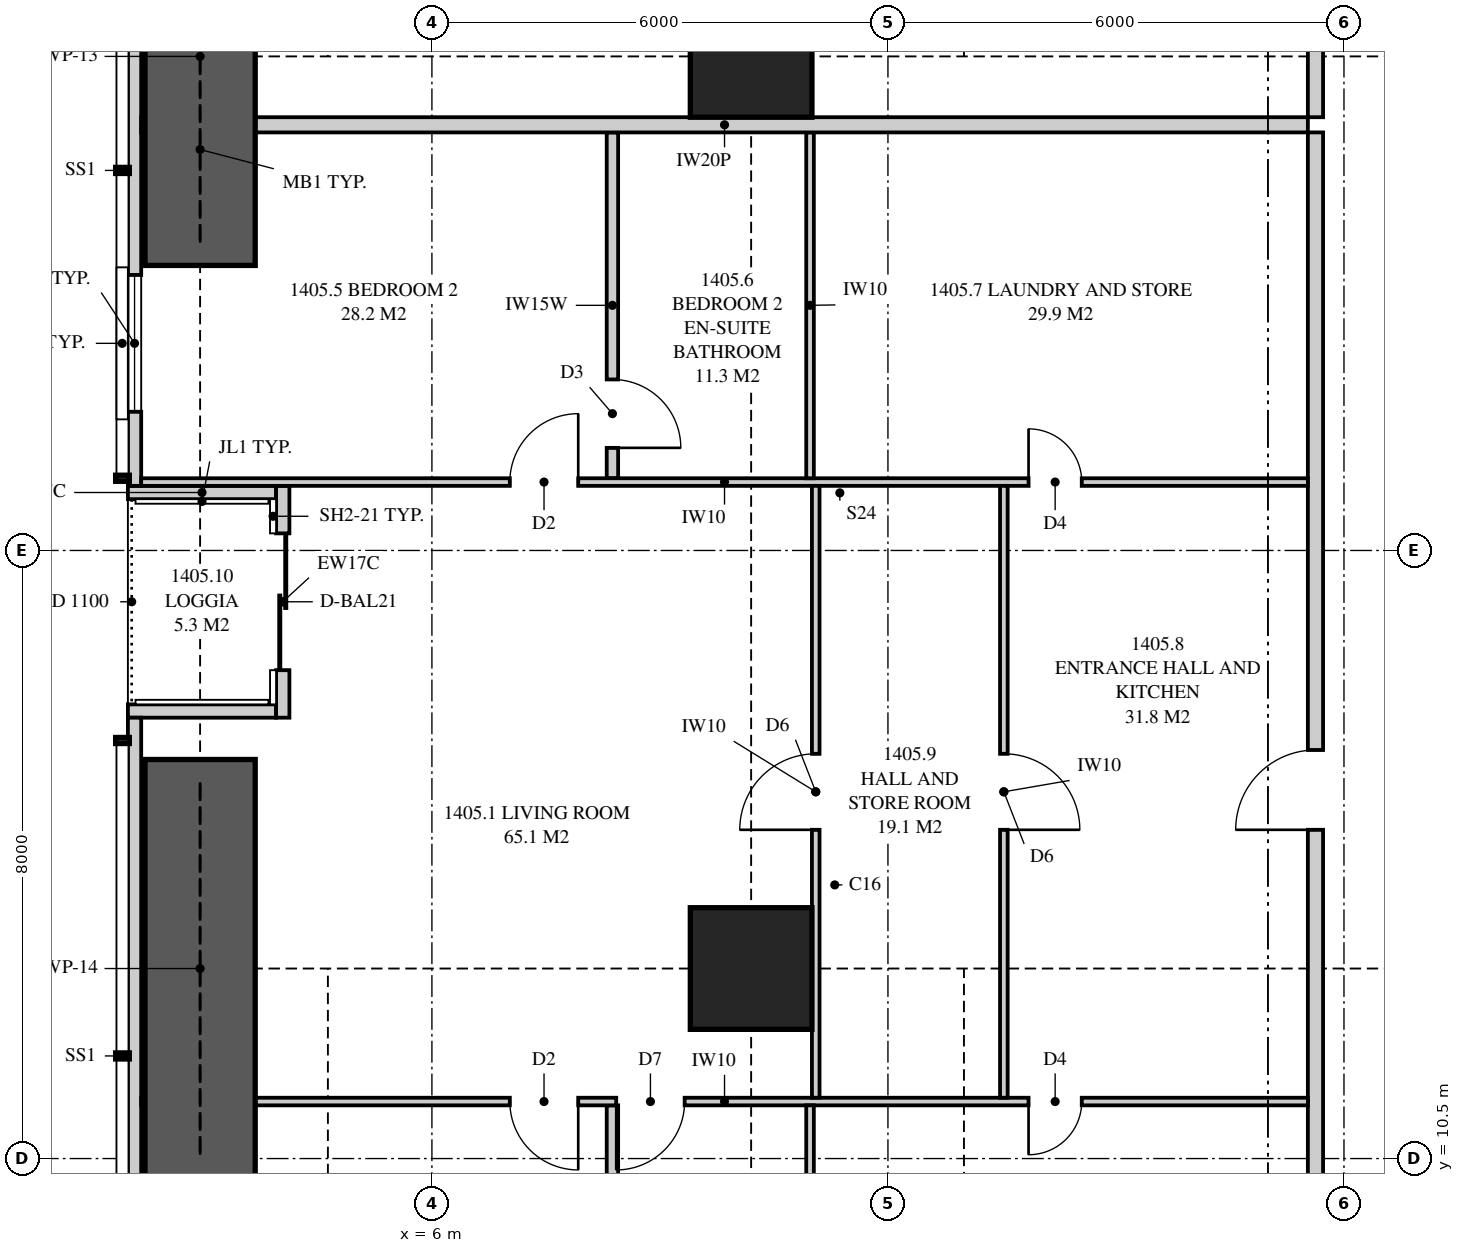
"""IFC4 building model, lengths in metres.
Left out: names, types, materials, properties, quantities, classifications, styles, units other than length and angle.
Written with IfcOpenShell. Run it as: python <this file> out.ifc"""

import sys

from ifc_helpers import new_model, si_unit, direction, frame, frame_2d, origin, origin_2d, place, context, subcontext, project, spatial, polyline, rectangle, outline, extrude, element, fill, save


model = new_model("IFC4")
c1 = context("Model", 3, precision=1e-05, world=origin(), true_north=direction((0.0, 1.0)))
c2 = subcontext(c1, "Body", "Model", "MODEL_VIEW")
j1 = project(units=[si_unit("LENGTHUNIT", "METRE"), si_unit("PLANEANGLEUNIT", "RADIAN")], contexts=[c1])
p1 = place(None, origin())
s1 = spatial("IfcSite", under=j1, at=p1, CompositionType="ELEMENT")
p2 = place(p1, origin())
s2 = spatial("IfcBuilding", under=s1, at=p2, CompositionType="ELEMENT")
p3 = place(p2, frame((0.0, 0.0, 54.5)))
s3 = spatial("IfcBuildingStorey", under=s2, at=p3, CompositionType="ELEMENT", Elevation=54.5)
for number, where, z_axis, x_axis in (
    (1, (10.2, 13.0, 0.0), (0.0, 0.0, 1.0), (1.0, 0.0, 0.0)),
    (2, (10.2, 25.0, 0.0), (0.0, 0.0, 1.0), (1.0, 0.0, 0.0)),
):
    element("IfcColumn", number, at=place(p3, frame(where, z_axis=z_axis, x_axis=x_axis)), inside=s3, PredefinedType="COLUMN", context=c2, shape_type="SweptSolid", body=[
        extrude(rectangle(XDim=1.6, YDim=1.6, at=origin_2d()), origin(), (0.0, 0.0, 1.0), 3.35),
    ])
p4 = place(p3, frame((2.087, 34.949, 0.0), z_axis=(0.0, 0.0, 1.0), x_axis=(0.0, -1.0, 0.0)))
e3 = element("IfcWall", 3, at=p4, inside=s3, PredefinedType="SOLIDWALL", context=c2, shape_type="SweptSolid", body=[
    extrude(outline(polyline([(0.0, 0.0), (15.599, 0.0), (15.599, 2.15), (9.949, 2.15), (9.949, 3.11), (9.823, 3.11), (9.823, 2.15), (9.73, 2.15), (9.73, 3.11), (0.0, 3.11), (0.0, 0.0)])), frame((0.0, 0.087, 0.0), z_axis=(0.0, -1.0, 0.0), x_axis=(1.0, 0.0, 0.0)), (0.0, 0.0, 1.0), 0.175),
])
p5 = place(p4, frame((2.722, 0.0, 0.4)))
e4 = element("IfcOpeningElement", 4, at=p5, cuts=e3, PredefinedType="OPENING", context=c2, shape_type="SweptSolid", body=[
    extrude(rectangle(XDim=1.8, YDim=1.7, at=frame_2d((0.9, 0.85))), frame((0.0, 0.097, 0.0), z_axis=(0.0, -1.0, 0.0), x_axis=(1.0, 0.0, 0.0)), (0.0, 0.0, 1.0), 0.195),
])
p6 = place(p4, frame((5.899, 0.0, 0.4)))
e5 = element("IfcOpeningElement", 5, at=p6, cuts=e3, PredefinedType="OPENING", context=c2, shape_type="SweptSolid", body=[
    extrude(rectangle(XDim=1.2, YDim=1.7, at=frame_2d((0.6, 0.85))), frame((0.0, 0.097, 0.0), z_axis=(0.0, -1.0, 0.0), x_axis=(1.0, 0.0, 0.0)), (0.0, 0.0, 1.0), 0.195),
])
p7 = place(p4, frame((12.824, 0.0, 0.4)))
e6 = element("IfcOpeningElement", 6, at=p7, cuts=e3, PredefinedType="OPENING", context=c2, shape_type="SweptSolid", body=[
    extrude(rectangle(XDim=1.8, YDim=1.7, at=frame_2d((0.9, 0.85))), frame((0.0, 0.097, 0.0), z_axis=(0.0, -1.0, 0.0), x_axis=(1.0, 0.0, 0.0)), (0.0, 0.0, 1.0), 0.195),
])
p8 = place(p3, frame((2.087, 16.3, 0.0), z_axis=(0.0, 0.0, 1.0), x_axis=(0.0, -1.0, 0.0)))
e7 = element("IfcWall", 7, at=p8, inside=s3, PredefinedType="SOLIDWALL", context=c2, shape_type="SweptSolid", body=[
    extrude(outline(polyline([(0.0, 0.0), (13.249, 0.0), (13.249, 3.11), (3.519, 3.11), (3.519, 2.15), (3.426, 2.15), (3.426, 3.11), (3.3, 3.11), (3.3, 2.15), (0.0, 2.15), (0.0, 0.0)])), frame((0.0, 0.087, 0.0), z_axis=(0.0, -1.0, 0.0), x_axis=(1.0, 0.0, 0.0)), (0.0, 0.0, 1.0), 0.175),
])
p9 = place(p8, frame((6.175, 0.0, 0.4)))
e8 = element("IfcOpeningElement", 8, at=p9, cuts=e7, PredefinedType="OPENING", context=c2, shape_type="SweptSolid", body=[
    extrude(rectangle(XDim=1.8, YDim=1.7, at=frame_2d((0.9, 0.85))), frame((0.0, 0.097, 0.0), z_axis=(0.0, -1.0, 0.0), x_axis=(1.0, 0.0, 0.0)), (0.0, 0.0, 1.0), 0.195),
])
p10 = place(p8, frame((9.227, 0.0, 0.4)))
e9 = element("IfcOpeningElement", 9, at=p10, cuts=e7, PredefinedType="OPENING", context=c2, shape_type="SweptSolid", body=[
    extrude(rectangle(XDim=1.8, YDim=1.7, at=frame_2d((0.9, 0.85))), frame((0.0, 0.097, 0.0), z_axis=(0.0, -1.0, 0.0), x_axis=(1.0, 0.0, 0.0)), (0.0, 0.0, 1.0), 0.195),
])
p11 = place(p3, frame((4.038, 19.35, 0.0), z_axis=(0.0, 0.0, 1.0), x_axis=(0.0, -1.0, 0.0)))
e10 = element("IfcWall", 10, at=p11, inside=s3, PredefinedType="SOLIDWALL", context=c2, shape_type="SweptSolid", body=[
    extrude(rectangle(XDim=3.05, YDim=0.175, at=frame_2d((1.525, 0.0))), origin(), (0.0, 0.0, 1.0), 3.11),
])
p12 = place(p11, frame((0.625, 0.0, 0.0)))
e11 = element("IfcOpeningElement", 11, at=p12, cuts=e10, PredefinedType="OPENING", context=c2, shape_type="SweptSolid", body=[
    extrude(rectangle(XDim=1.8, YDim=2.1, at=frame_2d((0.9, 1.05))), frame((0.0, 0.097, 0.0), z_axis=(0.0, -1.0, 0.0), x_axis=(1.0, 0.0, 0.0)), (0.0, 0.0, 1.0), 0.195),
])
for number, where, z_axis, x_axis in (
    (12, (2.0, 19.262, 0.0), (0.0, 0.0, 1.0), (1.0, 0.0, 0.0)),
    (13, (2.0, 16.387, 0.0), (0.0, 0.0, 1.0), (1.0, 0.0, 0.0)),
):
    element("IfcWall", number, at=place(p3, frame(where, z_axis=z_axis, x_axis=x_axis)), inside=s3, PredefinedType="SOLIDWALL", context=c2, shape_type="SweptSolid", body=[
        extrude(outline(polyline([(0.0, 0.0), (1.95, 0.0), (1.95, 3.11), (1.75, 3.11), (1.75, 2.15), (0.15, 2.15), (0.15, 3.11), (0.0, 3.11), (0.0, 0.0)])), frame((0.0, 0.087, 0.0), z_axis=(0.0, -1.0, 0.0), x_axis=(1.0, 0.0, 0.0)), (0.0, 0.0, 1.0), 0.175),
    ])
p13 = place(p3, frame((2.175, 24.1, 0.0), z_axis=(0.0, 0.0, 1.0), x_axis=(1.0, 0.0, 0.0)))
e14 = element("IfcWall", 14, at=p13, inside=s3, PredefinedType="PARTITIONING", context=c2, shape_type="SweptSolid", body=[
    extrude(outline(polyline([(0.529, 2.15), (0.0, 2.15), (0.0, 0.0), (0.529, 0.0), (0.529, 0.889), (1.021, 0.889), (1.021, 0.0), (15.35, 0.0), (15.35, 3.11), (9.335, 3.11), (9.335, 2.51), (6.715, 2.51), (6.715, 3.11), (1.685, 3.11), (1.685, 2.15), (1.021, 2.15), (1.021, 1.261), (0.529, 1.261), (0.529, 2.15)])), frame((0.0, 0.1, 0.0), z_axis=(0.0, -1.0, 0.0), x_axis=(1.0, 0.0, 0.0)), (0.0, 0.0, 1.0), 0.2),
])
p14 = place(p3, frame((17.625, 7.75, 0.0), z_axis=(0.0, 0.0, 1.0), x_axis=(0.0, 1.0, 0.0)))
e15 = element("IfcWall", 15, at=p14, inside=s3, PredefinedType="PARTITIONING", context=c2, shape_type="SweptSolid", body=[
    extrude(outline(polyline([(0.0, 0.0), (16.25, 0.0), (16.25, 3.11), (5.587, 3.11), (5.587, 2.541), (4.913, 2.541), (4.913, 3.11), (0.0, 3.11), (0.0, 0.0)])), frame((0.0, 0.1, 0.0), z_axis=(0.0, -1.0, 0.0), x_axis=(1.0, 0.0, 0.0)), (0.0, 0.0, 1.0), 0.2),
])
p15 = place(p14, frame((7.075, 0.0, 0.0)))
e16 = element("IfcOpeningElement", 16, at=p15, cuts=e15, PredefinedType="OPENING", context=c2, shape_type="SweptSolid", body=[
    extrude(rectangle(XDim=1.05, YDim=2.2, at=frame_2d((0.525, 1.1))), frame((0.0, 0.11, 0.0), z_axis=(0.0, -1.0, 0.0), x_axis=(1.0, 0.0, 0.0)), (0.0, 0.0, 1.0), 0.22),
])
p16 = place(p3, frame((2.175, 11.25, 0.0), z_axis=(0.0, 0.0, 1.0), x_axis=(1.0, 0.0, 0.0)))
e17 = element("IfcWall", 17, at=p16, inside=s3, PredefinedType="PARTITIONING", context=c2, shape_type="SweptSolid", body=[
    extrude(outline(polyline([(0.188, 3.11), (0.0, 3.11), (0.0, 0.0), (0.529, 0.0), (0.529, 0.273), (1.021, 0.273), (1.021, 0.0), (15.35, 0.0), (15.35, 3.11), (11.112, 3.11), (11.112, 2.541), (10.538, 2.541), (10.538, 3.11), (9.285, 3.11), (9.285, 2.51), (6.765, 2.51), (6.765, 3.11), (2.744, 3.11), (2.744, 2.541), (2.169, 2.541), (2.169, 3.11), (1.93, 3.11), (1.93, 2.15), (1.021, 2.15), (1.021, 1.876), (0.529, 1.876), (0.529, 2.15), (0.188, 2.15), (0.188, 3.11)])), frame((0.0, 0.05, 0.0), z_axis=(0.0, -1.0, 0.0), x_axis=(1.0, 0.0, 0.0)), (0.0, 0.0, 1.0), 0.1),
])
p17 = place(p16, frame((4.85, 0.0, 0.0)))
e18 = element("IfcOpeningElement", 18, at=p17, cuts=e17, PredefinedType="OPENING", context=c2, shape_type="SweptSolid", body=[
    extrude(rectangle(XDim=0.9, YDim=2.1, at=frame_2d((0.45, 1.05))), frame((0.0, 0.06, 0.0), z_axis=(0.0, -1.0, 0.0), x_axis=(1.0, 0.0, 0.0)), (0.0, 0.0, 1.0), 0.12),
])
p18 = place(p16, frame((6.25, 0.0, 0.0)))
e19 = element("IfcOpeningElement", 19, at=p18, cuts=e17, PredefinedType="OPENING", context=c2, shape_type="SweptSolid", body=[
    extrude(rectangle(XDim=0.9, YDim=2.1, at=frame_2d((0.45, 1.05))), frame((0.0, 0.06, 0.0), z_axis=(0.0, -1.0, 0.0), x_axis=(1.0, 0.0, 0.0)), (0.0, 0.0, 1.0), 0.12),
])
p19 = place(p16, frame((11.675, 0.0, 0.0)))
e20 = element("IfcOpeningElement", 20, at=p19, cuts=e17, PredefinedType="OPENING", context=c2, shape_type="SweptSolid", body=[
    extrude(rectangle(XDim=0.7, YDim=2.1, at=frame_2d((0.35, 1.05))), frame((0.0, 0.06, 0.0), z_axis=(0.0, -1.0, 0.0), x_axis=(1.0, 0.0, 0.0)), (0.0, 0.0, 1.0), 0.12),
])
p20 = place(p3, frame((2.175, 19.4, 0.0), z_axis=(0.0, 0.0, 1.0), x_axis=(1.0, 0.0, 0.0)))
e21 = element("IfcWall", 21, at=p20, inside=s3, PredefinedType="PARTITIONING", context=c2, shape_type="SweptSolid", body=[
    extrude(outline(polyline([(0.0, 0.0), (15.35, 0.0), (15.35, 3.11), (9.285, 3.11), (9.285, 2.51), (6.765, 2.51), (6.765, 3.11), (1.635, 3.11), (1.635, 2.15), (0.0, 2.15), (0.0, 3.11), (0.0, 0.0)])), frame((0.0, 0.05, 0.0), z_axis=(0.0, -1.0, 0.0), x_axis=(1.0, 0.0, 0.0)), (0.0, 0.0, 1.0), 0.1),
])
p21 = place(p20, frame((4.85, 0.0, 0.0)))
e22 = element("IfcOpeningElement", 22, at=p21, cuts=e21, PredefinedType="OPENING", context=c2, shape_type="SweptSolid", body=[
    extrude(rectangle(XDim=0.9, YDim=2.1, at=frame_2d((0.45, 1.05))), frame((0.0, 0.06, 0.0), z_axis=(0.0, -1.0, 0.0), x_axis=(1.0, 0.0, 0.0)), (0.0, 0.0, 1.0), 0.12),
])
p22 = place(p20, frame((11.675, 0.0, 0.0)))
e23 = element("IfcOpeningElement", 23, at=p22, cuts=e21, PredefinedType="OPENING", context=c2, shape_type="SweptSolid", body=[
    extrude(rectangle(XDim=0.7, YDim=2.1, at=frame_2d((0.35, 1.05))), frame((0.0, 0.06, 0.0), z_axis=(0.0, -1.0, 0.0), x_axis=(1.0, 0.0, 0.0)), (0.0, 0.0, 1.0), 0.12),
])
p23 = place(p3, frame((8.375, 7.75, 0.0), z_axis=(0.0, 0.0, 1.0), x_axis=(0.0, 1.0, 0.0)))
e24 = element("IfcWall", 24, at=p23, inside=s3, PredefinedType="PLUMBINGWALL", context=c2, shape_type="SweptSolid", body=[
    extrude(rectangle(XDim=3.45, YDim=0.15, at=frame_2d((1.725, 0.0))), origin(), (0.0, 0.0, 1.0), 3.11),
])
p24 = place(p3, frame((10.975, 7.75, 0.0), z_axis=(0.0, 0.0, 1.0), x_axis=(0.0, 1.0, 0.0)))
e25 = element("IfcWall", 25, at=p24, inside=s3, PredefinedType="PARTITIONING", context=c2, shape_type="SweptSolid", body=[
    extrude(outline(polyline([(0.0, 0.0), (3.45, 0.0), (3.45, 3.11), (3.45, 2.51), (0.0, 2.51), (0.0, 3.11), (0.0, 0.0)])), frame((0.0, 0.05, 0.0), z_axis=(0.0, -1.0, 0.0), x_axis=(1.0, 0.0, 0.0)), (0.0, 0.0, 1.0), 0.1),
])
p25 = place(p3, frame((8.375, 19.45, 0.0), z_axis=(0.0, 0.0, 1.0), x_axis=(0.0, 1.0, 0.0)))
e26 = element("IfcWall", 26, at=p25, inside=s3, PredefinedType="PLUMBINGWALL", context=c2, shape_type="SweptSolid", body=[
    extrude(rectangle(XDim=4.55, YDim=0.15, at=frame_2d((2.275, 0.0))), origin(), (0.0, 0.0, 1.0), 3.11),
])
p26 = place(p25, frame((0.4, 0.0, 0.0)))
e27 = element("IfcOpeningElement", 27, at=p26, cuts=e26, PredefinedType="OPENING", context=c2, shape_type="SweptSolid", body=[
    extrude(rectangle(XDim=0.9, YDim=2.1, at=frame_2d((0.45, 1.05))), frame((0.0, 0.085, 0.0), z_axis=(0.0, -1.0, 0.0), x_axis=(1.0, 0.0, 0.0)), (0.0, 0.0, 1.0), 0.17),
])
p27 = place(p3, frame((10.975, 19.45, 0.0), z_axis=(0.0, 0.0, 1.0), x_axis=(0.0, 1.0, 0.0)))
e28 = element("IfcWall", 28, at=p27, inside=s3, PredefinedType="PARTITIONING", context=c2, shape_type="SweptSolid", body=[
    extrude(outline(polyline([(0.0, 0.0), (4.55, 0.0), (4.55, 3.11), (4.55, 2.51), (0.0, 2.51), (0.0, 3.11), (0.0, 0.0)])), frame((0.0, 0.05, 0.0), z_axis=(0.0, -1.0, 0.0), x_axis=(1.0, 0.0, 0.0)), (0.0, 0.0, 1.0), 0.1),
])
p28 = place(p3, frame((13.525, 11.3, 0.0), z_axis=(0.0, 0.0, 1.0), x_axis=(0.0, 1.0, 0.0)))
e29 = element("IfcWall", 29, at=p28, inside=s3, PredefinedType="PARTITIONING", context=c2, shape_type="SweptSolid", body=[
    extrude(outline(polyline([(0.0, 0.0), (8.05, 0.0), (8.05, 3.11), (1.987, 3.11), (1.987, 2.541), (1.413, 2.541), (1.413, 3.11), (0.0, 3.11), (0.0, 0.0)])), frame((0.0, 0.05, 0.0), z_axis=(0.0, -1.0, 0.0), x_axis=(1.0, 0.0, 0.0)), (0.0, 0.0, 1.0), 0.1),
])
p29 = place(p28, frame((3.525, 0.0, 0.0)))
e30 = element("IfcOpeningElement", 30, at=p29, cuts=e29, PredefinedType="OPENING", context=c2, shape_type="SweptSolid", body=[
    extrude(rectangle(XDim=1.0, YDim=2.1, at=frame_2d((0.5, 1.05))), frame((0.0, 0.06, 0.0), z_axis=(0.0, -1.0, 0.0), x_axis=(1.0, 0.0, 0.0)), (0.0, 0.0, 1.0), 0.12),
])
p30 = place(p3, frame((11.05, 11.3, 0.0), z_axis=(0.0, 0.0, 1.0), x_axis=(0.0, 1.0, 0.0)))
e31 = element("IfcWall", 31, at=p30, inside=s3, PredefinedType="PARTITIONING", context=c2, shape_type="SweptSolid", body=[
    extrude(rectangle(XDim=8.05, YDim=0.1, at=frame_2d((4.025, 0.0))), origin(), (0.0, 0.0, 1.0), 2.51),
])
p31 = place(p30, frame((3.525, 0.0, 0.0)))
e32 = element("IfcOpeningElement", 32, at=p31, cuts=e31, PredefinedType="OPENING", context=c2, shape_type="SweptSolid", body=[
    extrude(rectangle(XDim=1.0, YDim=2.1, at=frame_2d((0.5, 1.05))), frame((0.0, 0.06, 0.0), z_axis=(0.0, -1.0, 0.0), x_axis=(1.0, 0.0, 0.0)), (0.0, 0.0, 1.0), 0.12),
])
p32 = place(p3, frame((17.625, 24.2, 0.0), z_axis=(0.0, 0.0, 1.0), x_axis=(0.0, 1.0, 0.0)))
e33 = element("IfcWall", 33, at=p32, inside=s3, PredefinedType="PARTITIONING", context=c2, shape_type="SweptSolid", body=[
    extrude(outline(polyline([(0.0, 0.0), (5.05, 0.0), (5.05, 3.11), (1.137, 3.11), (1.137, 2.541), (0.463, 2.541), (0.463, 3.11), (0.0, 3.11), (0.0, 0.0)])), frame((0.0, 0.1, 0.0), z_axis=(0.0, -1.0, 0.0), x_axis=(1.0, 0.0, 0.0)), (0.0, 0.0, 1.0), 0.2),
])
p33 = place(p32, frame((1.075, 0.0, 0.0)))
e34 = element("IfcOpeningElement", 34, at=p33, cuts=e33, PredefinedType="OPENING", context=c2, shape_type="SweptSolid", body=[
    extrude(rectangle(XDim=1.8, YDim=2.1, at=frame_2d((0.9, 1.05))), frame((0.0, 0.11, 0.0), z_axis=(0.0, -1.0, 0.0), x_axis=(1.0, 0.0, 0.0)), (0.0, 0.0, 1.0), 0.22),
])
for number, where, z_axis, x_axis in (
    (35, (2.95, 22.25, 0.0), (0.0, 0.0, 1.0), (0.0, 1.0, 0.0)),
    (36, (2.95, 10.25, 0.0), (0.0, 0.0, 1.0), (0.0, 1.0, 0.0)),
):
    element("IfcWall", number, at=place(p3, frame(where, z_axis=z_axis, x_axis=x_axis)), inside=s3, PredefinedType="SHEAR", context=c2, shape_type="SweptSolid", body=[
        extrude(rectangle(XDim=5.5, YDim=1.45, at=frame_2d((2.75, 0.0))), origin(), (0.0, 0.0, 1.0), 3.35),
    ])
p34 = place(p7, origin())
e37 = element("IfcWindow", 37, at=p34, inside=s3, PartitioningType="SINGLE_PANEL", PredefinedType="WINDOW", context=c2, shape_type="SweptSolid", body=[
    extrude(rectangle(XDim=1.8, YDim=1.7, at=frame_2d((0.9, 0.85))), frame((0.0, 0.03, 0.0), z_axis=(0.0, -1.0, 0.0), x_axis=(1.0, 0.0, 0.0)), (0.0, 0.0, 1.0), 0.06),
])
fill(e6, e37)
p35 = place(p12, origin())
e38 = element("IfcDoor", 38, at=p35, inside=s3, OperationType="SLIDING_TO_LEFT", PredefinedType="DOOR", context=c2, shape_type="SweptSolid", body=[
    extrude(rectangle(XDim=1.8, YDim=2.1, at=frame_2d((0.9, 1.05))), frame((0.0, 0.025, 0.0), z_axis=(0.0, -1.0, 0.0), x_axis=(1.0, 0.0, 0.0)), (0.0, 0.0, 1.0), 0.05),
])
fill(e11, e38)
p36 = place(p15, origin())
e39 = element("IfcDoor", 39, at=p36, inside=s3, OperationType="SINGLE_SWING_LEFT", PredefinedType="DOOR", context=c2, shape_type="SweptSolid", body=[
    extrude(rectangle(XDim=1.05, YDim=2.2, at=frame_2d((0.525, 1.1))), frame((0.0, 0.025, 0.0), z_axis=(0.0, -1.0, 0.0), x_axis=(1.0, 0.0, 0.0)), (0.0, 0.0, 1.0), 0.05),
])
fill(e16, e39)
p37 = place(p17, frame((0.9, 0.0, 0.0), z_axis=(0.0, 0.0, 1.0), x_axis=(-1.0, 0.0, 0.0)))
e40 = element("IfcDoor", 40, at=p37, inside=s3, OperationType="SINGLE_SWING_LEFT", PredefinedType="DOOR", context=c2, shape_type="SweptSolid", body=[
    extrude(rectangle(XDim=0.9, YDim=2.1, at=frame_2d((0.45, 1.05))), frame((0.0, 0.025, 0.0), z_axis=(0.0, -1.0, 0.0), x_axis=(1.0, 0.0, 0.0)), (0.0, 0.0, 1.0), 0.05),
])
fill(e18, e40)
p38 = place(p18, frame((0.9, 0.0, 0.0), z_axis=(0.0, 0.0, 1.0), x_axis=(-1.0, 0.0, 0.0)))
e41 = element("IfcDoor", 41, at=p38, inside=s3, OperationType="SINGLE_SWING_RIGHT", PredefinedType="DOOR", context=c2, shape_type="SweptSolid", body=[
    extrude(rectangle(XDim=0.9, YDim=2.1, at=frame_2d((0.45, 1.05))), frame((0.0, 0.025, 0.0), z_axis=(0.0, -1.0, 0.0), x_axis=(1.0, 0.0, 0.0)), (0.0, 0.0, 1.0), 0.05),
])
fill(e19, e41)
p39 = place(p19, frame((0.7, 0.0, 0.0), z_axis=(0.0, 0.0, 1.0), x_axis=(-1.0, 0.0, 0.0)))
e42 = element("IfcDoor", 42, at=p39, inside=s3, OperationType="SINGLE_SWING_RIGHT", PredefinedType="DOOR", context=c2, shape_type="SweptSolid", body=[
    extrude(rectangle(XDim=0.7, YDim=2.1, at=frame_2d((0.35, 1.05))), frame((0.0, 0.025, 0.0), z_axis=(0.0, -1.0, 0.0), x_axis=(1.0, 0.0, 0.0)), (0.0, 0.0, 1.0), 0.05),
])
fill(e20, e42)
p40 = place(p21, origin())
e43 = element("IfcDoor", 43, at=p40, inside=s3, OperationType="SINGLE_SWING_RIGHT", PredefinedType="DOOR", context=c2, shape_type="SweptSolid", body=[
    extrude(rectangle(XDim=0.9, YDim=2.1, at=frame_2d((0.45, 1.05))), frame((0.0, 0.025, 0.0), z_axis=(0.0, -1.0, 0.0), x_axis=(1.0, 0.0, 0.0)), (0.0, 0.0, 1.0), 0.05),
])
fill(e22, e43)
p41 = place(p26, frame((0.9, 0.0, 0.0), z_axis=(0.0, 0.0, 1.0), x_axis=(-1.0, 0.0, 0.0)))
e44 = element("IfcDoor", 44, at=p41, inside=s3, OperationType="SINGLE_SWING_RIGHT", PredefinedType="DOOR", context=c2, shape_type="SweptSolid", body=[
    extrude(rectangle(XDim=0.9, YDim=2.1, at=frame_2d((0.45, 1.05))), frame((0.0, 0.025, 0.0), z_axis=(0.0, -1.0, 0.0), x_axis=(1.0, 0.0, 0.0)), (0.0, 0.0, 1.0), 0.05),
])
fill(e27, e44)
p42 = place(p22, origin())
e45 = element("IfcDoor", 45, at=p42, inside=s3, OperationType="SINGLE_SWING_LEFT", PredefinedType="DOOR", context=c2, shape_type="SweptSolid", body=[
    extrude(rectangle(XDim=0.7, YDim=2.1, at=frame_2d((0.35, 1.05))), frame((0.0, 0.025, 0.0), z_axis=(0.0, -1.0, 0.0), x_axis=(1.0, 0.0, 0.0)), (0.0, 0.0, 1.0), 0.05),
])
fill(e23, e45)
p43 = place(p29, frame((1.0, 0.0, 0.0), z_axis=(0.0, 0.0, 1.0), x_axis=(-1.0, 0.0, 0.0)))
e46 = element("IfcDoor", 46, at=p43, inside=s3, OperationType="SINGLE_SWING_RIGHT", PredefinedType="DOOR", context=c2, shape_type="SweptSolid", body=[
    extrude(rectangle(XDim=1.0, YDim=2.1, at=frame_2d((0.5, 1.05))), frame((0.0, 0.025, 0.0), z_axis=(0.0, -1.0, 0.0), x_axis=(1.0, 0.0, 0.0)), (0.0, 0.0, 1.0), 0.05),
])
fill(e30, e46)
p44 = place(p31, origin())
e47 = element("IfcDoor", 47, at=p44, inside=s3, OperationType="SINGLE_SWING_LEFT", PredefinedType="DOOR", context=c2, shape_type="SweptSolid", body=[
    extrude(rectangle(XDim=1.0, YDim=2.1, at=frame_2d((0.5, 1.05))), frame((0.0, 0.025, 0.0), z_axis=(0.0, -1.0, 0.0), x_axis=(1.0, 0.0, 0.0)), (0.0, 0.0, 1.0), 0.05),
])
fill(e32, e47)
save(model, sys.argv[1])
